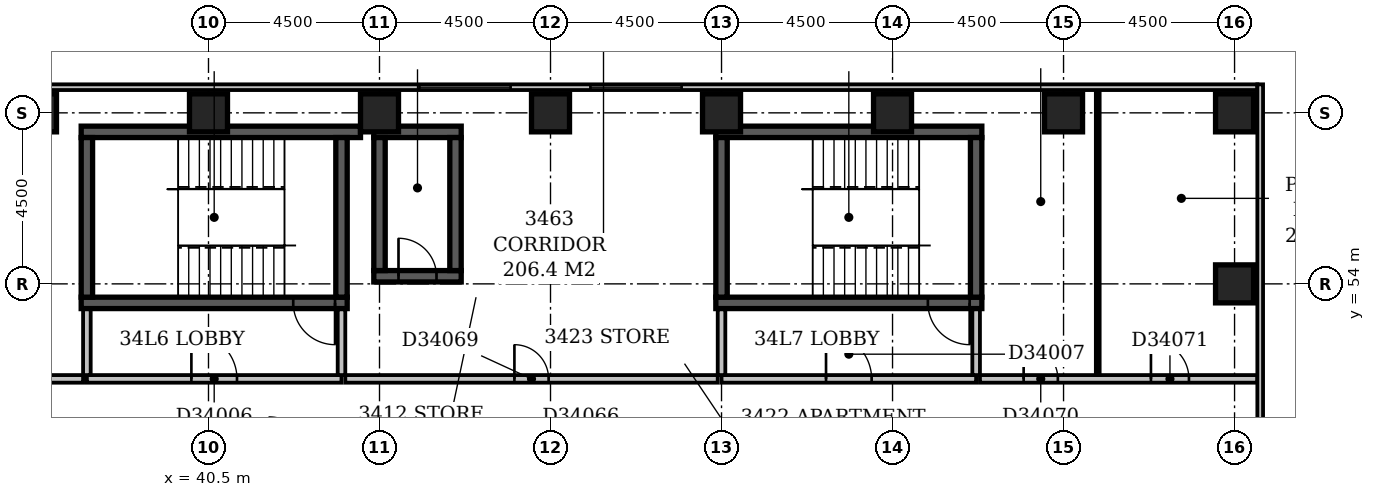
"""IFC4 building model, lengths in metres.
Left out: names, types, materials, properties, quantities, classifications, styles, units other than length and angle.
Written with IfcOpenShell. Run it as: python <this file> out.ifc"""

import sys

from ifc_helpers import new_model, si_unit, direction, frame, frame_2d, origin, origin_2d, place, context, subcontext, project, spatial, rectangle, extrude, element, fill, save


model = new_model("IFC4")
c1 = context("Model", 3, precision=1e-05, world=origin(), true_north=direction((0.0, 1.0)))
c2 = subcontext(c1, "Body", "Model", "MODEL_VIEW")
j1 = project(units=[si_unit("LENGTHUNIT", "METRE"), si_unit("PLANEANGLEUNIT", "RADIAN")], contexts=[c1])
p1 = place(None, origin())
s1 = spatial("IfcSite", under=j1, at=p1, CompositionType="ELEMENT")
p2 = place(p1, origin())
s2 = spatial("IfcBuilding", under=s1, at=p2, CompositionType="ELEMENT")
p3 = place(p2, frame((0.0, 0.0, 137.6)))
s3 = spatial("IfcBuildingStorey", under=s2, at=p3, CompositionType="ELEMENT", Elevation=137.6)
p4 = place(p3, frame((37.15, 53.5, -0.3), z_axis=(0.0, 0.0, 1.0), x_axis=(1.0, 0.0, 0.0)))
e1 = element("IfcWall", 1, at=p4, inside=s3, PredefinedType="SHEAR", context=c2, shape_type="SweptSolid", body=[
    extrude(rectangle(XDim=7.0, YDim=0.3, at=frame_2d((3.5, 0.0))), origin(), (0.0, 0.0, 1.0), 3.6),
])
p5 = place(p4, frame((5.58, 0.0, 0.3)))
e2 = element("IfcOpeningElement", 2, at=p5, cuts=e1, PredefinedType="OPENING", context=c2, shape_type="SweptSolid", body=[
    extrude(rectangle(XDim=1.1, YDim=2.1, at=frame_2d((0.55, 1.05))), frame((0.0, 0.162, 0.0), z_axis=(0.0, -1.0, 0.0), x_axis=(1.0, 0.0, 0.0)), (0.0, 0.0, 1.0), 0.324),
])
p6 = place(p3, frame((37.15, 58.0, -0.3), z_axis=(0.0, 0.0, 1.0), x_axis=(1.0, 0.0, 0.0)))
e3 = element("IfcWall", 3, at=p6, inside=s3, PredefinedType="SHEAR", context=c2, shape_type="SweptSolid", body=[
    extrude(rectangle(XDim=7.35, YDim=0.3, at=frame_2d((3.675, 0.0))), origin(), (0.0, 0.0, 1.0), 3.6),
])
for number, where, z_axis, x_axis in (
    (4, (37.3, 53.65, -0.3), (0.0, 0.0, 1.0), (0.0, 1.0, 0.0)),
    (5, (44.0, 53.65, -0.3), (0.0, 0.0, 1.0), (0.0, 1.0, 0.0)),
):
    element("IfcWall", number, at=place(p3, frame(where, z_axis=z_axis, x_axis=x_axis)), inside=s3, PredefinedType="SHEAR", context=c2, shape_type="SweptSolid", body=[
        extrude(rectangle(XDim=4.2, YDim=0.3, at=frame_2d((2.1, 0.0))), origin(), (0.0, 0.0, 1.0), 3.6),
    ])
p7 = place(p3, frame((44.85, 54.2, -0.3), z_axis=(0.0, 0.0, 1.0), x_axis=(1.0, 0.0, 0.0)))
e6 = element("IfcWall", 6, at=p7, inside=s3, PredefinedType="SHEAR", context=c2, shape_type="SweptSolid", body=[
    extrude(rectangle(XDim=2.3, YDim=0.3, at=frame_2d((1.15, 0.0))), origin(), (0.0, 0.0, 1.0), 3.6),
])
p8 = place(p7, frame((0.65, 0.0, 0.3)))
e7 = element("IfcOpeningElement", 7, at=p8, cuts=e6, PredefinedType="OPENING", context=c2, shape_type="SweptSolid", body=[
    extrude(rectangle(XDim=1.0, YDim=2.1, at=frame_2d((0.5, 1.05))), frame((0.0, 0.162, 0.0), z_axis=(0.0, -1.0, 0.0), x_axis=(1.0, 0.0, 0.0)), (0.0, 0.0, 1.0), 0.324),
])
p9 = place(p3, frame((44.85, 58.0, -0.3), z_axis=(0.0, 0.0, 1.0), x_axis=(1.0, 0.0, 0.0)))
e8 = element("IfcWall", 8, at=p9, inside=s3, PredefinedType="SHEAR", context=c2, shape_type="SweptSolid", body=[
    extrude(rectangle(XDim=2.3, YDim=0.3, at=frame_2d((1.15, 0.0))), origin(), (0.0, 0.0, 1.0), 3.6),
])
for number, where, z_axis, x_axis in (
    (9, (45.0, 54.35, -0.3), (0.0, 0.0, 1.0), (0.0, 1.0, 0.0)),
    (10, (47.0, 54.35, -0.3), (0.0, 0.0, 1.0), (0.0, 1.0, 0.0)),
):
    element("IfcWall", number, at=place(p3, frame(where, z_axis=z_axis, x_axis=x_axis)), inside=s3, PredefinedType="SHEAR", context=c2, shape_type="SweptSolid", body=[
        extrude(rectangle(XDim=3.5, YDim=0.3, at=frame_2d((1.75, 0.0))), origin(), (0.0, 0.0, 1.0), 3.6),
    ])
p10 = place(p3, frame((53.85, 53.5, -0.3), z_axis=(0.0, 0.0, 1.0), x_axis=(1.0, 0.0, 0.0)))
e11 = element("IfcWall", 11, at=p10, inside=s3, PredefinedType="SHEAR", context=c2, shape_type="SweptSolid", body=[
    extrude(rectangle(XDim=7.0, YDim=0.3, at=frame_2d((3.5, 0.0))), origin(), (0.0, 0.0, 1.0), 3.6),
])
p11 = place(p10, frame((5.58, 0.0, 0.3)))
e12 = element("IfcOpeningElement", 12, at=p11, cuts=e11, PredefinedType="OPENING", context=c2, shape_type="SweptSolid", body=[
    extrude(rectangle(XDim=1.1, YDim=2.1, at=frame_2d((0.55, 1.05))), frame((0.0, 0.162, 0.0), z_axis=(0.0, -1.0, 0.0), x_axis=(1.0, 0.0, 0.0)), (0.0, 0.0, 1.0), 0.324),
])
p12 = place(p3, frame((53.85, 58.0, -0.3), z_axis=(0.0, 0.0, 1.0), x_axis=(1.0, 0.0, 0.0)))
e13 = element("IfcWall", 13, at=p12, inside=s3, PredefinedType="SHEAR", context=c2, shape_type="SweptSolid", body=[
    extrude(rectangle(XDim=7.0, YDim=0.3, at=frame_2d((3.5, 0.0))), origin(), (0.0, 0.0, 1.0), 3.6),
])
for number, where, z_axis, x_axis in (
    (14, (54.0, 53.65, -0.3), (0.0, 0.0, 1.0), (0.0, 1.0, 0.0)),
    (15, (60.7, 53.65, -0.3), (0.0, 0.0, 1.0), (0.0, 1.0, 0.0)),
):
    element("IfcWall", number, at=place(p3, frame(where, z_axis=z_axis, x_axis=x_axis)), inside=s3, PredefinedType="SHEAR", context=c2, shape_type="SweptSolid", body=[
        extrude(rectangle(XDim=4.2, YDim=0.3, at=frame_2d((2.1, 0.0))), origin(), (0.0, 0.0, 1.0), 3.6),
    ])
for number, where, z_axis, x_axis in (
    (16, (67.5, 54.0, -0.3), (0.0, 0.0, 1.0), (1.0, 0.0, 0.0)),
    (17, (36.0, 58.5, -0.3), (0.0, 0.0, 1.0), (1.0, 0.0, 0.0)),
    (18, (40.5, 58.5, -0.3), (0.0, 0.0, 1.0), (1.0, 0.0, 0.0)),
    (19, (45.0, 58.5, -0.3), (0.0, 0.0, 1.0), (1.0, 0.0, 0.0)),
    (20, (49.5, 58.5, -0.3), (0.0, 0.0, 1.0), (1.0, 0.0, 0.0)),
    (21, (54.0, 58.5, -0.3), (0.0, 0.0, 1.0), (1.0, 0.0, 0.0)),
    (22, (58.5, 58.5, -0.3), (0.0, 0.0, 1.0), (1.0, 0.0, 0.0)),
    (23, (63.0, 58.5, -0.3), (0.0, 0.0, 1.0), (1.0, 0.0, 0.0)),
    (24, (67.5, 58.5, -0.3), (0.0, 0.0, 1.0), (1.0, 0.0, 0.0)),
):
    element("IfcColumn", number, at=place(p3, frame(where, z_axis=z_axis, x_axis=x_axis)), inside=s3, PredefinedType="COLUMN", context=c2, shape_type="SweptSolid", body=[
        extrude(rectangle(XDim=1.0, YDim=1.0, at=origin_2d()), origin(), (0.0, 0.0, 1.0), 3.6),
    ])
p13 = place(p3, frame((68.175, 35.4, 0.0), z_axis=(0.0, 0.0, 1.0), x_axis=(0.0, 1.0, 0.0)))
e25 = element("IfcWall", 25, at=p13, inside=s3, PredefinedType="STANDARD", context=c2, shape_type="SweptSolid", body=[
    extrude(rectangle(XDim=23.85, YDim=0.15, at=frame_2d((11.925, 0.0))), origin(), (0.0, 0.0, 1.0), 2.7),
])
p14 = place(p13, frame((2.54, 0.0, 0.6)))
e26 = element("IfcOpeningElement", 26, at=p14, cuts=e25, PredefinedType="OPENING", context=c2, shape_type="SweptSolid", body=[
    extrude(rectangle(XDim=1.8, YDim=1.8, at=frame_2d((0.9, 0.9))), frame((0.0, 0.087, 0.0), z_axis=(0.0, -1.0, 0.0), x_axis=(1.0, 0.0, 0.0)), (0.0, 0.0, 1.0), 0.174),
])
p15 = place(p13, frame((10.65, 0.0, 0.6)))
e27 = element("IfcOpeningElement", 27, at=p15, cuts=e25, PredefinedType="OPENING", context=c2, shape_type="SweptSolid", body=[
    extrude(rectangle(XDim=2.4, YDim=1.8, at=frame_2d((1.2, 0.9))), frame((0.0, 0.087, 0.0), z_axis=(0.0, -1.0, 0.0), x_axis=(1.0, 0.0, 0.0)), (0.0, 0.0, 1.0), 0.174),
])
p16 = place(p3, frame((68.1, 59.175, 0.0), z_axis=(0.0, 0.0, 1.0), x_axis=(-1.0, 0.0, 0.0)))
e28 = element("IfcWall", 28, at=p16, inside=s3, PredefinedType="STANDARD", context=c2, shape_type="SweptSolid", body=[
    extrude(rectangle(XDim=68.85, YDim=0.15, at=frame_2d((34.425, 0.0))), origin(), (0.0, 0.0, 1.0), 2.7),
])
p17 = place(p16, frame((15.15, 0.0, 0.6)))
e29 = element("IfcOpeningElement", 29, at=p17, cuts=e28, PredefinedType="OPENING", context=c2, shape_type="SweptSolid", body=[
    extrude(rectangle(XDim=2.4, YDim=1.8, at=frame_2d((1.2, 0.9))), frame((0.0, 0.087, 0.0), z_axis=(0.0, -1.0, 0.0), x_axis=(1.0, 0.0, 0.0)), (0.0, 0.0, 1.0), 0.174),
])
p18 = place(p16, frame((19.65, 0.0, 0.6)))
e30 = element("IfcOpeningElement", 30, at=p18, cuts=e28, PredefinedType="OPENING", context=c2, shape_type="SweptSolid", body=[
    extrude(rectangle(XDim=2.4, YDim=1.8, at=frame_2d((1.2, 0.9))), frame((0.0, 0.087, 0.0), z_axis=(0.0, -1.0, 0.0), x_axis=(1.0, 0.0, 0.0)), (0.0, 0.0, 1.0), 0.174),
])
p19 = place(p16, frame((37.65, 0.0, 0.6)))
e31 = element("IfcOpeningElement", 31, at=p19, cuts=e28, PredefinedType="OPENING", context=c2, shape_type="SweptSolid", body=[
    extrude(rectangle(XDim=2.4, YDim=1.8, at=frame_2d((1.2, 0.9))), frame((0.0, 0.087, 0.0), z_axis=(0.0, -1.0, 0.0), x_axis=(1.0, 0.0, 0.0)), (0.0, 0.0, 1.0), 0.174),
])
p20 = place(p3, frame((37.3, 51.5, 0.0), z_axis=(0.0, 0.0, 1.0), x_axis=(1.0, 0.0, 0.0)))
e32 = element("IfcWall", 32, at=p20, inside=s3, PredefinedType="PARTITIONING", context=c2, shape_type="SweptSolid", body=[
    extrude(rectangle(XDim=6.7, YDim=0.2, at=frame_2d((3.35, 0.0))), origin(), (0.0, 0.0, 1.0), 3.3),
])
p21 = place(p20, frame((2.75, 0.0, 0.0)))
e33 = element("IfcOpeningElement", 33, at=p21, cuts=e32, PredefinedType="OPENING", context=c2, shape_type="SweptSolid", body=[
    extrude(rectangle(XDim=1.2, YDim=2.1, at=frame_2d((0.6, 1.05))), frame((0.0, 0.112, 0.0), z_axis=(0.0, -1.0, 0.0), x_axis=(1.0, 0.0, 0.0)), (0.0, 0.0, 1.0), 0.224),
])
for number, where, z_axis, x_axis in (
    (34, (44.0, 51.6, 0.0), (0.0, 0.0, 1.0), (0.0, 1.0, 0.0)),
    (35, (37.3, 51.6, 0.0), (0.0, 0.0, 1.0), (0.0, 1.0, 0.0)),
):
    element("IfcWall", number, at=place(p3, frame(where, z_axis=z_axis, x_axis=x_axis)), inside=s3, PredefinedType="PARTITIONING", context=c2, shape_type="SweptSolid", body=[
        extrude(rectangle(XDim=1.73, YDim=0.2, at=frame_2d((0.865, 0.0))), origin(), (0.0, 0.0, 1.0), 3.3),
    ])
p22 = place(p3, frame((54.0, 51.5, 0.0), z_axis=(0.0, 0.0, 1.0), x_axis=(1.0, 0.0, 0.0)))
e36 = element("IfcWall", 36, at=p22, inside=s3, PredefinedType="PARTITIONING", context=c2, shape_type="SweptSolid", body=[
    extrude(rectangle(XDim=6.7, YDim=0.2, at=frame_2d((3.35, 0.0))), origin(), (0.0, 0.0, 1.0), 3.3),
])
p23 = place(p22, frame((2.75, 0.0, 0.0)))
e37 = element("IfcOpeningElement", 37, at=p23, cuts=e36, PredefinedType="OPENING", context=c2, shape_type="SweptSolid", body=[
    extrude(rectangle(XDim=1.2, YDim=2.1, at=frame_2d((0.6, 1.05))), frame((0.0, 0.112, 0.0), z_axis=(0.0, -1.0, 0.0), x_axis=(1.0, 0.0, 0.0)), (0.0, 0.0, 1.0), 0.224),
])
p24 = place(p3, frame((60.7, 51.6, 0.0), z_axis=(0.0, 0.0, 1.0), x_axis=(0.0, 1.0, 0.0)))
e38 = element("IfcWall", 38, at=p24, inside=s3, PredefinedType="PARTITIONING", context=c2, shape_type="SweptSolid", body=[
    extrude(rectangle(XDim=1.73, YDim=0.2, at=frame_2d((0.865, 0.0))), origin(), (0.0, 0.0, 1.0), 3.3),
])
p25 = place(p3, frame((54.0, 51.6, 0.0), z_axis=(0.0, 0.0, 1.0), x_axis=(0.0, 1.0, 0.0)))
e39 = element("IfcWall", 39, at=p25, inside=s3, PredefinedType="PARTITIONING", context=c2, shape_type="SweptSolid", body=[
    extrude(rectangle(XDim=1.73, YDim=0.2, at=frame_2d((0.865, 0.0))), origin(), (0.0, 0.0, 1.0), 2.6),
])
p26 = place(p3, frame((27.9, 51.5, 0.0), z_axis=(0.0, 0.0, 1.0), x_axis=(1.0, 0.0, 0.0)))
e40 = element("IfcWall", 40, at=p26, inside=s3, PredefinedType="PARTITIONING", context=c2, shape_type="SweptSolid", body=[
    extrude(rectangle(XDim=9.3, YDim=0.2, at=frame_2d((4.65, 0.0))), origin(), (0.0, 0.0, 1.0), 3.3),
])
p27 = place(p26, frame((4.2, 0.0, 0.0)))
e41 = element("IfcOpeningElement", 41, at=p27, cuts=e40, PredefinedType="OPENING", context=c2, shape_type="SweptSolid", body=[
    extrude(rectangle(XDim=0.9, YDim=2.1, at=frame_2d((0.45, 1.05))), frame((0.0, 0.112, 0.0), z_axis=(0.0, -1.0, 0.0), x_axis=(1.0, 0.0, 0.0)), (0.0, 0.0, 1.0), 0.224),
])
p28 = place(p3, frame((44.1, 51.5, 0.0), z_axis=(0.0, 0.0, 1.0), x_axis=(1.0, 0.0, 0.0)))
e42 = element("IfcWall", 42, at=p28, inside=s3, PredefinedType="PARTITIONING", context=c2, shape_type="SweptSolid", body=[
    extrude(rectangle(XDim=9.8, YDim=0.2, at=frame_2d((4.9, 0.0))), origin(), (0.0, 0.0, 1.0), 3.3),
])
p29 = place(p28, frame((4.45, 0.0, 0.0)))
e43 = element("IfcOpeningElement", 43, at=p29, cuts=e42, PredefinedType="OPENING", context=c2, shape_type="SweptSolid", body=[
    extrude(rectangle(XDim=0.9, YDim=2.1, at=frame_2d((0.45, 1.05))), frame((0.0, 0.112, 0.0), z_axis=(0.0, -1.0, 0.0), x_axis=(1.0, 0.0, 0.0)), (0.0, 0.0, 1.0), 0.224),
])
p30 = place(p3, frame((60.8, 51.5, 0.0), z_axis=(0.0, 0.0, 1.0), x_axis=(1.0, 0.0, 0.0)))
e44 = element("IfcWall", 44, at=p30, inside=s3, PredefinedType="PARTITIONING", context=c2, shape_type="SweptSolid", body=[
    extrude(rectangle(XDim=7.3, YDim=0.2, at=frame_2d((3.65, 0.0))), origin(), (0.0, 0.0, 1.0), 3.3),
])
p31 = place(p30, frame((1.15, 0.0, 0.0)))
e45 = element("IfcOpeningElement", 45, at=p31, cuts=e44, PredefinedType="OPENING", context=c2, shape_type="SweptSolid", body=[
    extrude(rectangle(XDim=0.9, YDim=2.1, at=frame_2d((0.45, 1.05))), frame((0.0, 0.112, 0.0), z_axis=(0.0, -1.0, 0.0), x_axis=(1.0, 0.0, 0.0)), (0.0, 0.0, 1.0), 0.224),
])
p32 = place(p30, frame((4.5, 0.0, 0.0)))
e46 = element("IfcOpeningElement", 46, at=p32, cuts=e44, PredefinedType="OPENING", context=c2, shape_type="SweptSolid", body=[
    extrude(rectangle(XDim=1.0, YDim=2.1, at=frame_2d((0.5, 1.05))), frame((0.0, 0.112, 0.0), z_axis=(0.0, -1.0, 0.0), x_axis=(1.0, 0.0, 0.0)), (0.0, 0.0, 1.0), 0.224),
])
p33 = place(p3, frame((63.9, 51.6, 0.0), z_axis=(0.0, 0.0, 1.0), x_axis=(0.0, 1.0, 0.0)))
e47 = element("IfcWall", 47, at=p33, inside=s3, PredefinedType="PARTITIONING", context=c2, shape_type="SweptSolid", body=[
    extrude(rectangle(XDim=7.5, YDim=0.1, at=frame_2d((3.75, 0.0))), origin(), (0.0, 0.0, 1.0), 3.3),
])
p34 = place(p17, origin())
e48 = element("IfcWindow", 48, at=p34, inside=s3, PartitioningType="SINGLE_PANEL", PredefinedType="WINDOW", context=c2, shape_type="SweptSolid", body=[
    extrude(rectangle(XDim=2.4, YDim=1.8, at=frame_2d((1.2, 0.9))), frame((0.0, 0.03, 0.0), z_axis=(0.0, -1.0, 0.0), x_axis=(1.0, 0.0, 0.0)), (0.0, 0.0, 1.0), 0.06),
])
fill(e29, e48)
p35 = place(p18, origin())
e49 = element("IfcWindow", 49, at=p35, inside=s3, PartitioningType="SINGLE_PANEL", PredefinedType="WINDOW", context=c2, shape_type="SweptSolid", body=[
    extrude(rectangle(XDim=2.4, YDim=1.8, at=frame_2d((1.2, 0.9))), frame((0.0, 0.03, 0.0), z_axis=(0.0, -1.0, 0.0), x_axis=(1.0, 0.0, 0.0)), (0.0, 0.0, 1.0), 0.06),
])
fill(e30, e49)
p36 = place(p21, origin())
e50 = element("IfcDoor", 50, at=p36, inside=s3, OperationType="SINGLE_SWING_LEFT", PredefinedType="DOOR", context=c2, shape_type="SweptSolid", body=[
    extrude(rectangle(XDim=1.2, YDim=2.1, at=frame_2d((0.6, 1.05))), frame((0.0, 0.025, 0.0), z_axis=(0.0, -1.0, 0.0), x_axis=(1.0, 0.0, 0.0)), (0.0, 0.0, 1.0), 0.05),
])
fill(e33, e50)
p37 = place(p23, origin())
e51 = element("IfcDoor", 51, at=p37, inside=s3, OperationType="SINGLE_SWING_LEFT", PredefinedType="DOOR", context=c2, shape_type="SweptSolid", body=[
    extrude(rectangle(XDim=1.2, YDim=2.1, at=frame_2d((0.6, 1.05))), frame((0.0, 0.025, 0.0), z_axis=(0.0, -1.0, 0.0), x_axis=(1.0, 0.0, 0.0)), (0.0, 0.0, 1.0), 0.05),
])
fill(e37, e51)
p38 = place(p8, origin())
e52 = element("IfcDoor", 52, at=p38, inside=s3, OperationType="SINGLE_SWING_LEFT", PredefinedType="DOOR", context=c2, shape_type="SweptSolid", body=[
    extrude(rectangle(XDim=1.0, YDim=2.1, at=frame_2d((0.5, 1.05))), frame((0.0, 0.025, 0.0), z_axis=(0.0, -1.0, 0.0), x_axis=(1.0, 0.0, 0.0)), (0.0, 0.0, 1.0), 0.05),
])
fill(e7, e52)
p39 = place(p5, origin())
e53 = element("IfcDoor", 53, at=p39, inside=s3, OperationType="SINGLE_SWING_RIGHT", PredefinedType="DOOR", context=c2, shape_type="SweptSolid", body=[
    extrude(rectangle(XDim=1.1, YDim=2.1, at=frame_2d((0.55, 1.05))), frame((0.0, 0.025, 0.0), z_axis=(0.0, -1.0, 0.0), x_axis=(1.0, 0.0, 0.0)), (0.0, 0.0, 1.0), 0.05),
])
fill(e2, e53)
p40 = place(p11, origin())
e54 = element("IfcDoor", 54, at=p40, inside=s3, OperationType="SINGLE_SWING_RIGHT", PredefinedType="DOOR", context=c2, shape_type="SweptSolid", body=[
    extrude(rectangle(XDim=1.1, YDim=2.1, at=frame_2d((0.55, 1.05))), frame((0.0, 0.025, 0.0), z_axis=(0.0, -1.0, 0.0), x_axis=(1.0, 0.0, 0.0)), (0.0, 0.0, 1.0), 0.05),
])
fill(e12, e54)
p41 = place(p29, origin())
e55 = element("IfcDoor", 55, at=p41, inside=s3, OperationType="SINGLE_SWING_LEFT", PredefinedType="DOOR", context=c2, shape_type="SweptSolid", body=[
    extrude(rectangle(XDim=0.9, YDim=2.1, at=frame_2d((0.45, 1.05))), frame((0.0, 0.025, 0.0), z_axis=(0.0, -1.0, 0.0), x_axis=(1.0, 0.0, 0.0)), (0.0, 0.0, 1.0), 0.05),
])
fill(e43, e55)
p42 = place(p31, origin())
e56 = element("IfcDoor", 56, at=p42, inside=s3, OperationType="SINGLE_SWING_LEFT", PredefinedType="DOOR", context=c2, shape_type="SweptSolid", body=[
    extrude(rectangle(XDim=0.9, YDim=2.1, at=frame_2d((0.45, 1.05))), frame((0.0, 0.025, 0.0), z_axis=(0.0, -1.0, 0.0), x_axis=(1.0, 0.0, 0.0)), (0.0, 0.0, 1.0), 0.05),
])
fill(e45, e56)
p43 = place(p32, origin())
e57 = element("IfcDoor", 57, at=p43, inside=s3, OperationType="SINGLE_SWING_LEFT", PredefinedType="DOOR", context=c2, shape_type="SweptSolid", body=[
    extrude(rectangle(XDim=1.0, YDim=2.1, at=frame_2d((0.5, 1.05))), frame((0.0, 0.025, 0.0), z_axis=(0.0, -1.0, 0.0), x_axis=(1.0, 0.0, 0.0)), (0.0, 0.0, 1.0), 0.05),
])
fill(e46, e57)
save(model, sys.argv[1])
